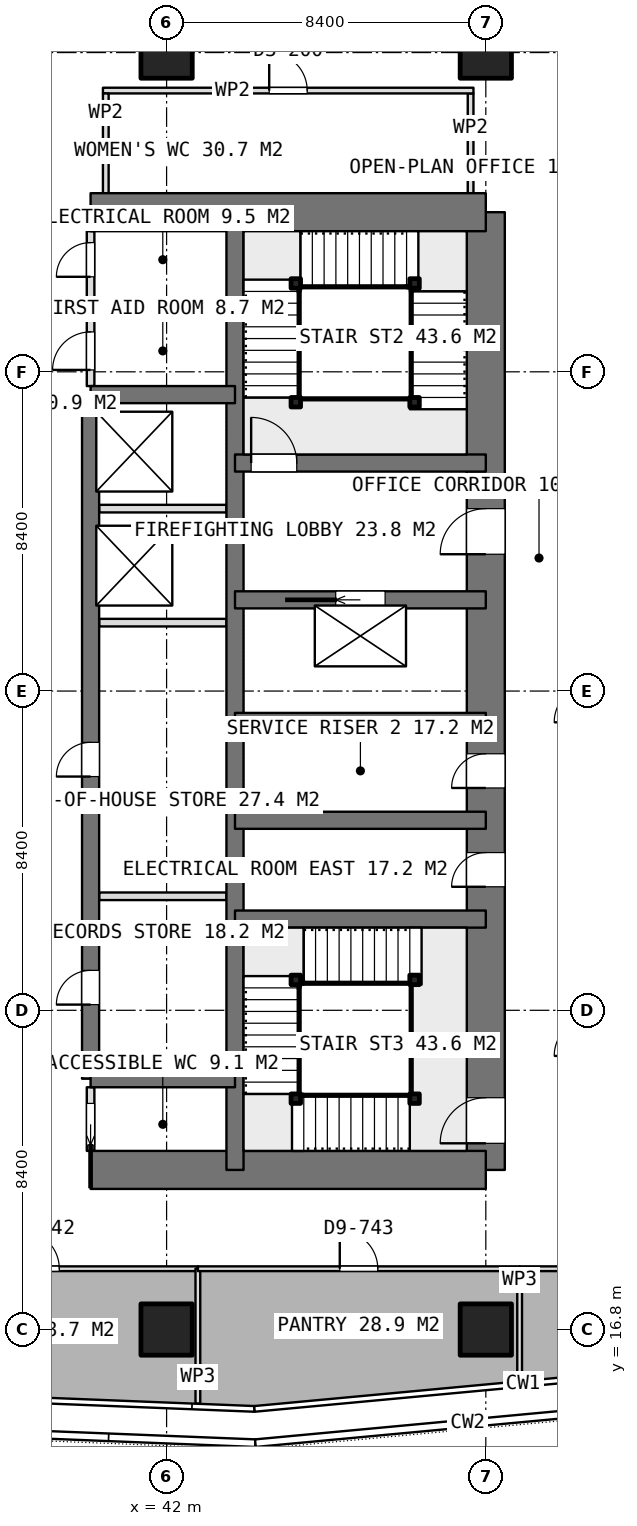
"""IFC4 building model, lengths in metres.
Left out: names, types, materials, properties, quantities, classifications, styles, units other than length and angle.
Written with IfcOpenShell. Run it as: python <this file> out.ifc"""

import sys

from ifc_helpers import new_model, si_unit, direction, frame, frame_2d, origin, origin_2d, place, context, subcontext, project, spatial, rectangle, extrude, element, fill, save


model = new_model("IFC4")
c1 = context("Model", 3, precision=1e-05, world=origin(), true_north=direction((0.0, 1.0)))
c2 = subcontext(c1, "Body", "Model", "MODEL_VIEW")
j1 = project(units=[si_unit("LENGTHUNIT", "METRE"), si_unit("PLANEANGLEUNIT", "RADIAN")], contexts=[c1])
p1 = place(None, origin())
s1 = spatial("IfcSite", under=j1, at=p1, CompositionType="ELEMENT")
p2 = place(p1, origin())
s2 = spatial("IfcBuilding", under=s1, at=p2, CompositionType="ELEMENT")
p3 = place(p2, frame((0.0, 0.0, 187.7)))
s3 = spatial("IfcBuildingStorey", under=s2, at=p3, CompositionType="ELEMENT", Elevation=187.7)
for number, where, z_axis, x_axis in (
    (1, (40.0, 21.0, 0.0), (0.0, 0.0, 1.0), (1.0, 0.0, 0.0)),
    (2, (40.0, 46.2, 0.0), (0.0, 0.0, 1.0), (1.0, 0.0, 0.0)),
):
    element("IfcWall", number, at=place(p3, frame(where, z_axis=z_axis, x_axis=x_axis)), inside=s3, PredefinedType="SHEAR", context=c2, shape_type="SweptSolid", body=[
        extrude(rectangle(XDim=10.4, YDim=1.0, at=frame_2d((5.2, 0.0))), origin(), (0.0, 0.0, 1.0), 3.75),
    ])
p4 = place(p3, frame((50.4, 21.0, 0.0), z_axis=(0.0, 0.0, 1.0), x_axis=(0.0, 1.0, 0.0)))
e3 = element("IfcWall", 3, at=p4, inside=s3, PredefinedType="SHEAR", context=c2, shape_type="SweptSolid", body=[
    extrude(rectangle(XDim=25.2, YDim=1.0, at=frame_2d((12.6, 0.0))), origin(), (0.0, 0.0, 1.0), 3.75),
])
p5 = place(p4, frame((16.2, 0.0, 0.0)))
e4 = element("IfcOpeningElement", 4, at=p5, cuts=e3, PredefinedType="OPENING", context=c2, shape_type="SweptSolid", body=[
    extrude(rectangle(XDim=1.2, YDim=2.1, at=frame_2d((0.6, 1.05))), frame((0.0, 0.51, 0.0), z_axis=(0.0, -1.0, 0.0), x_axis=(1.0, 0.0, 0.0)), (0.0, 0.0, 1.0), 1.02),
])
p6 = place(p4, frame((10.05, 0.0, 0.0)))
e5 = element("IfcOpeningElement", 5, at=p6, cuts=e3, PredefinedType="OPENING", context=c2, shape_type="SweptSolid", body=[
    extrude(rectangle(XDim=0.9, YDim=2.1, at=frame_2d((0.45, 1.05))), frame((0.0, 0.51, 0.0), z_axis=(0.0, -1.0, 0.0), x_axis=(1.0, 0.0, 0.0)), (0.0, 0.0, 1.0), 1.02),
])
p7 = place(p4, frame((7.45, 0.0, 0.0)))
e6 = element("IfcOpeningElement", 6, at=p7, cuts=e3, PredefinedType="OPENING", context=c2, shape_type="SweptSolid", body=[
    extrude(rectangle(XDim=0.9, YDim=2.1, at=frame_2d((0.45, 1.05))), frame((0.0, 0.51, 0.0), z_axis=(0.0, -1.0, 0.0), x_axis=(1.0, 0.0, 0.0)), (0.0, 0.0, 1.0), 1.02),
])
p8 = place(p4, frame((0.7, 0.0, 0.0)))
e7 = element("IfcOpeningElement", 7, at=p8, cuts=e3, PredefinedType="OPENING", context=c2, shape_type="SweptSolid", body=[
    extrude(rectangle(XDim=1.2, YDim=2.1, at=frame_2d((0.6, 1.05))), frame((0.0, 0.51, 0.0), z_axis=(0.0, -1.0, 0.0), x_axis=(1.0, 0.0, 0.0)), (0.0, 0.0, 1.0), 1.02),
])
p9 = place(p3, frame((43.8, 21.0, 0.0), z_axis=(0.0, 0.0, 1.0), x_axis=(0.0, 1.0, 0.0)))
e8 = element("IfcWall", 8, at=p9, inside=s3, PredefinedType="SHEAR", context=c2, shape_type="SweptSolid", body=[
    extrude(rectangle(XDim=25.2, YDim=0.45, at=frame_2d((12.6, 0.0))), origin(), (0.0, 0.0, 1.0), 3.75),
])
p10 = place(p3, frame((40.0, 23.4, 0.0), z_axis=(0.0, 0.0, 1.0), x_axis=(0.0, 1.0, 0.0)))
e9 = element("IfcWall", 9, at=p10, inside=s3, PredefinedType="SHEAR", context=c2, shape_type="SweptSolid", body=[
    extrude(rectangle(XDim=18.0, YDim=0.45, at=frame_2d((9.0, 0.0))), origin(), (0.0, 0.0, 1.0), 3.75),
])
p11 = place(p10, frame((1.95, 0.0, 0.0)))
e10 = element("IfcOpeningElement", 10, at=p11, cuts=e9, PredefinedType="OPENING", context=c2, shape_type="SweptSolid", body=[
    extrude(rectangle(XDim=0.9, YDim=2.1, at=frame_2d((0.45, 1.05))), frame((0.0, 0.235, 0.0), z_axis=(0.0, -1.0, 0.0), x_axis=(1.0, 0.0, 0.0)), (0.0, 0.0, 1.0), 0.47),
])
p12 = place(p10, frame((7.95, 0.0, 0.0)))
e11 = element("IfcOpeningElement", 11, at=p12, cuts=e9, PredefinedType="OPENING", context=c2, shape_type="SweptSolid", body=[
    extrude(rectangle(XDim=0.9, YDim=2.1, at=frame_2d((0.45, 1.05))), frame((0.0, 0.235, 0.0), z_axis=(0.0, -1.0, 0.0), x_axis=(1.0, 0.0, 0.0)), (0.0, 0.0, 1.0), 0.47),
])
for number, where, z_axis, x_axis in (
    (12, (40.0, 23.4, 0.0), (0.0, 0.0, 1.0), (1.0, 0.0, 0.0)),
    (13, (40.0, 41.4, 0.0), (0.0, 0.0, 1.0), (1.0, 0.0, 0.0)),
):
    element("IfcWall", number, at=place(p3, frame(where, z_axis=z_axis, x_axis=x_axis)), inside=s3, PredefinedType="SHEAR", context=c2, shape_type="SweptSolid", body=[
        extrude(rectangle(XDim=3.8, YDim=0.45, at=frame_2d((1.9, 0.0))), origin(), (0.0, 0.0, 1.0), 3.75),
    ])
for number, where, z_axis, x_axis in (
    (14, (43.8, 27.6, 0.0), (0.0, 0.0, 1.0), (1.0, 0.0, 0.0)),
    (15, (43.8, 30.2, 0.0), (0.0, 0.0, 1.0), (1.0, 0.0, 0.0)),
    (16, (43.8, 32.8, 0.0), (0.0, 0.0, 1.0), (1.0, 0.0, 0.0)),
):
    element("IfcWall", number, at=place(p3, frame(where, z_axis=z_axis, x_axis=x_axis)), inside=s3, PredefinedType="SHEAR", context=c2, shape_type="SweptSolid", body=[
        extrude(rectangle(XDim=6.6, YDim=0.45, at=frame_2d((3.3, 0.0))), origin(), (0.0, 0.0, 1.0), 3.75),
    ])
p13 = place(p3, frame((43.8, 36.0, 0.0), z_axis=(0.0, 0.0, 1.0), x_axis=(1.0, 0.0, 0.0)))
e17 = element("IfcWall", 17, at=p13, inside=s3, PredefinedType="SHEAR", context=c2, shape_type="SweptSolid", body=[
    extrude(rectangle(XDim=6.6, YDim=0.45, at=frame_2d((3.3, 0.0))), origin(), (0.0, 0.0, 1.0), 3.75),
])
p14 = place(p13, frame((2.65, 0.0, 0.0)))
e18 = element("IfcOpeningElement", 18, at=p14, cuts=e17, PredefinedType="OPENING", context=c2, shape_type="SweptSolid", body=[
    extrude(rectangle(XDim=1.3, YDim=2.1, at=frame_2d((0.65, 1.05))), frame((0.0, 0.235, 0.0), z_axis=(0.0, -1.0, 0.0), x_axis=(1.0, 0.0, 0.0)), (0.0, 0.0, 1.0), 0.47),
])
p15 = place(p3, frame((43.8, 39.6, 0.0), z_axis=(0.0, 0.0, 1.0), x_axis=(1.0, 0.0, 0.0)))
e19 = element("IfcWall", 19, at=p15, inside=s3, PredefinedType="SHEAR", context=c2, shape_type="SweptSolid", body=[
    extrude(rectangle(XDim=6.6, YDim=0.45, at=frame_2d((3.3, 0.0))), origin(), (0.0, 0.0, 1.0), 3.75),
])
p16 = place(p15, frame((0.425, 0.0, 0.0)))
e20 = element("IfcOpeningElement", 20, at=p16, cuts=e19, PredefinedType="OPENING", context=c2, shape_type="SweptSolid", body=[
    extrude(rectangle(XDim=1.2, YDim=2.1, at=frame_2d((0.6, 1.05))), frame((0.0, 0.235, 0.0), z_axis=(0.0, -1.0, 0.0), x_axis=(1.0, 0.0, 0.0)), (0.0, 0.0, 1.0), 0.47),
])
for number, where, z_axis, x_axis in (
    (21, (42.0, 16.8, 0.0), (0.0, 0.0, 1.0), (1.0, 0.0, 0.0)),
    (22, (42.0, 50.4, 0.0), (0.0, 0.0, 1.0), (1.0, 0.0, 0.0)),
    (23, (50.4, 16.8, 0.0), (0.0, 0.0, 1.0), (1.0, 0.0, 0.0)),
    (24, (50.4, 50.4, 0.0), (0.0, 0.0, 1.0), (1.0, 0.0, 0.0)),
):
    element("IfcColumn", number, at=place(p3, frame(where, z_axis=z_axis, x_axis=x_axis)), inside=s3, PredefinedType="COLUMN", context=c2, shape_type="SweptSolid", body=[
        extrude(rectangle(XDim=1.35, YDim=1.35, at=origin_2d()), origin(), (0.0, 0.0, 1.0), 3.75),
    ])
for number, where, z_axis, x_axis in (
    (25, (40.225, 35.4, 0.0), (0.0, 0.0, 1.0), (1.0, 0.0, 0.0)),
    (26, (40.225, 38.4, 0.0), (0.0, 0.0, 1.0), (1.0, 0.0, 0.0)),
):
    element("IfcWall", number, at=place(p3, frame(where, z_axis=z_axis, x_axis=x_axis)), inside=s3, PredefinedType="PARTITIONING", context=c2, shape_type="SweptSolid", body=[
        extrude(rectangle(XDim=3.35, YDim=0.2, at=frame_2d((1.675, 0.0))), origin(), (0.0, 0.0, 1.0), 3.5),
    ])
p17 = place(p3, frame((40.0, 21.5, 0.0), z_axis=(0.0, 0.0, 1.0), x_axis=(0.0, 1.0, 0.0)))
e27 = element("IfcWall", 27, at=p17, inside=s3, PredefinedType="PARTITIONING", context=c2, shape_type="SweptSolid", body=[
    extrude(rectangle(XDim=1.675, YDim=0.2, at=frame_2d((0.837, 0.0))), origin(), (0.0, 0.0, 1.0), 3.5),
])
p18 = place(p17, frame((0.15, 0.0, 0.0)))
e28 = element("IfcOpeningElement", 28, at=p18, cuts=e27, PredefinedType="OPENING", context=c2, shape_type="SweptSolid", body=[
    extrude(rectangle(XDim=1.1, YDim=2.1, at=frame_2d((0.55, 1.05))), frame((0.0, 0.11, 0.0), z_axis=(0.0, -1.0, 0.0), x_axis=(1.0, 0.0, 0.0)), (0.0, 0.0, 1.0), 0.22),
])
p19 = place(p3, frame((40.0, 41.625, 0.0), z_axis=(0.0, 0.0, 1.0), x_axis=(0.0, 1.0, 0.0)))
e29 = element("IfcWall", 29, at=p19, inside=s3, PredefinedType="PARTITIONING", context=c2, shape_type="SweptSolid", body=[
    extrude(rectangle(XDim=4.075, YDim=0.2, at=frame_2d((2.038, 0.0))), origin(), (0.0, 0.0, 1.0), 3.5),
])
p20 = place(p19, frame((2.875, 0.0, 0.0)))
e30 = element("IfcOpeningElement", 30, at=p20, cuts=e29, PredefinedType="OPENING", context=c2, shape_type="SweptSolid", body=[
    extrude(rectangle(XDim=0.9, YDim=2.1, at=frame_2d((0.45, 1.05))), frame((0.0, 0.11, 0.0), z_axis=(0.0, -1.0, 0.0), x_axis=(1.0, 0.0, 0.0)), (0.0, 0.0, 1.0), 0.22),
])
p21 = place(p19, frame((0.425, 0.0, 0.0)))
e31 = element("IfcOpeningElement", 31, at=p21, cuts=e29, PredefinedType="OPENING", context=c2, shape_type="SweptSolid", body=[
    extrude(rectangle(XDim=1.0, YDim=2.1, at=frame_2d((0.5, 1.05))), frame((0.0, 0.11, 0.0), z_axis=(0.0, -1.0, 0.0), x_axis=(1.0, 0.0, 0.0)), (0.0, 0.0, 1.0), 0.22),
])
p22 = place(p3, frame((40.225, 28.2, 0.0), z_axis=(0.0, 0.0, 1.0), x_axis=(1.0, 0.0, 0.0)))
e32 = element("IfcWall", 32, at=p22, inside=s3, PredefinedType="PARTITIONING", context=c2, shape_type="SweptSolid", body=[
    extrude(rectangle(XDim=3.35, YDim=0.2, at=frame_2d((1.675, 0.0))), origin(), (0.0, 0.0, 1.0), 3.5),
])
p23 = place(p3, frame((40.0, 43.7, 0.0), z_axis=(0.0, 0.0, 1.0), x_axis=(1.0, 0.0, 0.0)))
e33 = element("IfcWall", 33, at=p23, inside=s3, PredefinedType="PARTITIONING", context=c2, shape_type="SweptSolid", body=[
    extrude(rectangle(XDim=3.575, YDim=0.2, at=frame_2d((1.788, 0.0))), origin(), (0.0, 0.0, 1.0), 3.5),
])
p24 = place(p3, frame((40.325, 49.4, 0.0), z_axis=(0.0, 0.0, 1.0), x_axis=(1.0, 0.0, 0.0)))
e34 = element("IfcWall", 34, at=p24, inside=s3, PredefinedType="PARTITIONING", context=c2, shape_type="SweptSolid", body=[
    extrude(rectangle(XDim=9.75, YDim=0.15, at=frame_2d((4.875, 0.0))), origin(), (0.0, 0.0, 1.0), 3.5),
])
p25 = place(p24, frame((4.375, 0.0, 0.0)))
e35 = element("IfcOpeningElement", 35, at=p25, cuts=e34, PredefinedType="OPENING", context=c2, shape_type="SweptSolid", body=[
    extrude(rectangle(XDim=1.0, YDim=2.1, at=frame_2d((0.5, 1.05))), frame((0.0, 0.085, 0.0), z_axis=(0.0, -1.0, 0.0), x_axis=(1.0, 0.0, 0.0)), (0.0, 0.0, 1.0), 0.17),
])
for number, where, z_axis, x_axis in (
    (36, (40.4, 46.7, 0.0), (0.0, 0.0, 1.0), (0.0, 1.0, 0.0)),
    (37, (50.0, 46.7, 0.0), (0.0, 0.0, 1.0), (0.0, 1.0, 0.0)),
):
    element("IfcWall", number, at=place(p3, frame(where, z_axis=z_axis, x_axis=x_axis)), inside=s3, PredefinedType="PARTITIONING", context=c2, shape_type="SweptSolid", body=[
        extrude(rectangle(XDim=2.625, YDim=0.15, at=frame_2d((1.312, 0.0))), origin(), (0.0, 0.0, 1.0), 3.5),
    ])
p26 = place(p3, frame((34.531, 18.4, 0.0), z_axis=(0.0, 0.0, 1.0), x_axis=(1.0, 0.0, 0.0)))
e38 = element("IfcWall", 38, at=p26, inside=s3, PredefinedType="PARTITIONING", context=c2, shape_type="SweptSolid", body=[
    extrude(rectangle(XDim=8.292, YDim=0.125, at=frame_2d((4.146, 0.0))), origin(), (0.0, 0.0, 1.0), 3.5),
])
p27 = place(p26, frame((3.646, 0.0, 0.0)))
e39 = element("IfcOpeningElement", 39, at=p27, cuts=e38, PredefinedType="OPENING", context=c2, shape_type="SweptSolid", body=[
    extrude(rectangle(XDim=1.0, YDim=2.1, at=frame_2d((0.5, 1.05))), frame((0.0, 0.073, 0.0), z_axis=(0.0, -1.0, 0.0), x_axis=(1.0, 0.0, 0.0)), (0.0, 0.0, 1.0), 0.145),
])
p28 = place(p3, frame((42.823, 18.4, 0.0), z_axis=(0.0, 0.0, 1.0), x_axis=(0.0, -1.0, 0.0)))
e40 = element("IfcWall", 40, at=p28, inside=s3, PredefinedType="PARTITIONING", context=c2, shape_type="SweptSolid", body=[
    extrude(rectangle(XDim=3.549, YDim=0.125, at=frame_2d((1.774, 0.0))), origin(), (0.0, 0.0, 1.0), 3.5),
])
p29 = place(p3, frame((42.824, 18.4, 0.0), z_axis=(0.0, 0.0, 1.0), x_axis=(1.0, 0.0, 0.0)))
e41 = element("IfcWall", 41, at=p29, inside=s3, PredefinedType="PARTITIONING", context=c2, shape_type="SweptSolid", body=[
    extrude(rectangle(XDim=8.466, YDim=0.125, at=frame_2d((4.233, 0.0))), origin(), (0.0, 0.0, 1.0), 3.5),
])
p30 = place(p29, frame((3.733, 0.0, 0.0)))
e42 = element("IfcOpeningElement", 42, at=p30, cuts=e41, PredefinedType="OPENING", context=c2, shape_type="SweptSolid", body=[
    extrude(rectangle(XDim=1.0, YDim=2.1, at=frame_2d((0.5, 1.05))), frame((0.0, 0.073, 0.0), z_axis=(0.0, -1.0, 0.0), x_axis=(1.0, 0.0, 0.0)), (0.0, 0.0, 1.0), 0.145),
])
p31 = place(p3, frame((51.29, 18.4, 0.0), z_axis=(0.0, 0.0, 1.0), x_axis=(0.0, -1.0, 0.0)))
e43 = element("IfcWall", 43, at=p31, inside=s3, PredefinedType="PARTITIONING", context=c2, shape_type="SweptSolid", body=[
    extrude(rectangle(XDim=2.958, YDim=0.125, at=frame_2d((1.479, 0.0))), origin(), (0.0, 0.0, 1.0), 3.5),
])
p32 = place(p3, frame((51.291, 18.4, 0.0), z_axis=(0.0, 0.0, 1.0), x_axis=(1.0, 0.0, 0.0)))
e44 = element("IfcWall", 44, at=p32, inside=s3, PredefinedType="PARTITIONING", context=c2, shape_type="SweptSolid", body=[
    extrude(rectangle(XDim=5.109, YDim=0.125, at=frame_2d((2.554, 0.0))), origin(), (0.0, 0.0, 1.0), 3.5),
])
p33 = place(p32, frame((2.055, 0.0, 0.0)))
e45 = element("IfcOpeningElement", 45, at=p33, cuts=e44, PredefinedType="OPENING", context=c2, shape_type="SweptSolid", body=[
    extrude(rectangle(XDim=1.0, YDim=2.1, at=frame_2d((0.5, 1.05))), frame((0.0, 0.073, 0.0), z_axis=(0.0, -1.0, 0.0), x_axis=(1.0, 0.0, 0.0)), (0.0, 0.0, 1.0), 0.145),
])
for number, where, z_axis, x_axis in (
    (46, (45.4, 41.2, 0.0), (0.0, 0.0, 1.0), (1.0, 0.0, 0.0)),
    (47, (45.4, 44.325, 0.0), (0.0, 0.0, 1.0), (1.0, 0.0, 0.0)),
    (48, (48.525, 44.325, 0.0), (0.0, 0.0, 1.0), (1.0, 0.0, 0.0)),
    (49, (48.525, 41.2, 0.0), (0.0, 0.0, 1.0), (1.0, 0.0, 0.0)),
    (50, (48.525, 22.875, 0.0), (0.0, 0.0, 1.0), (1.0, 0.0, 0.0)),
    (51, (45.4, 22.875, 0.0), (0.0, 0.0, 1.0), (1.0, 0.0, 0.0)),
    (52, (45.4, 26.0, 0.0), (0.0, 0.0, 1.0), (1.0, 0.0, 0.0)),
    (53, (48.525, 26.0, 0.0), (0.0, 0.0, 1.0), (1.0, 0.0, 0.0)),
):
    element("IfcColumn", number, at=place(p3, frame(where, z_axis=z_axis, x_axis=x_axis)), inside=s3, PredefinedType="COLUMN", context=c2, shape_type="SweptSolid", body=[
        extrude(rectangle(XDim=0.25, YDim=0.25, at=origin_2d()), origin(), (0.0, 0.0, 1.0), 3.75),
    ])
p34 = place(p5, origin())
e54 = element("IfcDoor", 54, at=p34, inside=s3, OperationType="SINGLE_SWING_LEFT", PredefinedType="DOOR", context=c2, shape_type="SweptSolid", body=[
    extrude(rectangle(XDim=1.2, YDim=2.1, at=frame_2d((0.6, 1.05))), frame((0.0, 0.025, 0.0), z_axis=(0.0, -1.0, 0.0), x_axis=(1.0, 0.0, 0.0)), (0.0, 0.0, 1.0), 0.05),
])
fill(e4, e54)
p35 = place(p6, origin())
e55 = element("IfcDoor", 55, at=p35, inside=s3, OperationType="SINGLE_SWING_LEFT", PredefinedType="DOOR", context=c2, shape_type="SweptSolid", body=[
    extrude(rectangle(XDim=0.9, YDim=2.1, at=frame_2d((0.45, 1.05))), frame((0.0, 0.025, 0.0), z_axis=(0.0, -1.0, 0.0), x_axis=(1.0, 0.0, 0.0)), (0.0, 0.0, 1.0), 0.05),
])
fill(e5, e55)
p36 = place(p7, origin())
e56 = element("IfcDoor", 56, at=p36, inside=s3, OperationType="SINGLE_SWING_LEFT", PredefinedType="DOOR", context=c2, shape_type="SweptSolid", body=[
    extrude(rectangle(XDim=0.9, YDim=2.1, at=frame_2d((0.45, 1.05))), frame((0.0, 0.025, 0.0), z_axis=(0.0, -1.0, 0.0), x_axis=(1.0, 0.0, 0.0)), (0.0, 0.0, 1.0), 0.05),
])
fill(e6, e56)
p37 = place(p18, origin())
e57 = element("IfcDoor", 57, at=p37, inside=s3, OperationType="SLIDING_TO_LEFT", PredefinedType="DOOR", context=c2, shape_type="SweptSolid", body=[
    extrude(rectangle(XDim=1.1, YDim=2.1, at=frame_2d((0.55, 1.05))), frame((0.0, 0.025, 0.0), z_axis=(0.0, -1.0, 0.0), x_axis=(1.0, 0.0, 0.0)), (0.0, 0.0, 1.0), 0.05),
])
fill(e28, e57)
p38 = place(p20, origin())
e58 = element("IfcDoor", 58, at=p38, inside=s3, OperationType="SINGLE_SWING_LEFT", PredefinedType="DOOR", context=c2, shape_type="SweptSolid", body=[
    extrude(rectangle(XDim=0.9, YDim=2.1, at=frame_2d((0.45, 1.05))), frame((0.0, 0.025, 0.0), z_axis=(0.0, -1.0, 0.0), x_axis=(1.0, 0.0, 0.0)), (0.0, 0.0, 1.0), 0.05),
])
fill(e30, e58)
p39 = place(p21, origin())
e59 = element("IfcDoor", 59, at=p39, inside=s3, OperationType="SINGLE_SWING_LEFT", PredefinedType="DOOR", context=c2, shape_type="SweptSolid", body=[
    extrude(rectangle(XDim=1.0, YDim=2.1, at=frame_2d((0.5, 1.05))), frame((0.0, 0.025, 0.0), z_axis=(0.0, -1.0, 0.0), x_axis=(1.0, 0.0, 0.0)), (0.0, 0.0, 1.0), 0.05),
])
fill(e31, e59)
p40 = place(p11, origin())
e60 = element("IfcDoor", 60, at=p40, inside=s3, OperationType="SINGLE_SWING_LEFT", PredefinedType="DOOR", context=c2, shape_type="SweptSolid", body=[
    extrude(rectangle(XDim=0.9, YDim=2.1, at=frame_2d((0.45, 1.05))), frame((0.0, 0.025, 0.0), z_axis=(0.0, -1.0, 0.0), x_axis=(1.0, 0.0, 0.0)), (0.0, 0.0, 1.0), 0.05),
])
fill(e10, e60)
p41 = place(p12, origin())
e61 = element("IfcDoor", 61, at=p41, inside=s3, OperationType="SINGLE_SWING_LEFT", PredefinedType="DOOR", context=c2, shape_type="SweptSolid", body=[
    extrude(rectangle(XDim=0.9, YDim=2.1, at=frame_2d((0.45, 1.05))), frame((0.0, 0.025, 0.0), z_axis=(0.0, -1.0, 0.0), x_axis=(1.0, 0.0, 0.0)), (0.0, 0.0, 1.0), 0.05),
])
fill(e11, e61)
p42 = place(p14, origin())
e62 = element("IfcDoor", 62, at=p42, inside=s3, OperationType="SLIDING_TO_LEFT", PredefinedType="USERDEFINED", context=c2, shape_type="SweptSolid", body=[
    extrude(rectangle(XDim=1.3, YDim=2.1, at=frame_2d((0.65, 1.05))), frame((0.0, 0.025, 0.0), z_axis=(0.0, -1.0, 0.0), x_axis=(1.0, 0.0, 0.0)), (0.0, 0.0, 1.0), 0.05),
])
fill(e18, e62)
p43 = place(p25, origin())
e63 = element("IfcDoor", 63, at=p43, inside=s3, OperationType="SINGLE_SWING_LEFT", PredefinedType="DOOR", context=c2, shape_type="SweptSolid", body=[
    extrude(rectangle(XDim=1.0, YDim=2.1, at=frame_2d((0.5, 1.05))), frame((0.0, 0.025, 0.0), z_axis=(0.0, -1.0, 0.0), x_axis=(1.0, 0.0, 0.0)), (0.0, 0.0, 1.0), 0.05),
])
fill(e35, e63)
p44 = place(p27, origin())
e64 = element("IfcDoor", 64, at=p44, inside=s3, OperationType="SINGLE_SWING_LEFT", PredefinedType="DOOR", context=c2, shape_type="SweptSolid", body=[
    extrude(rectangle(XDim=1.0, YDim=2.1, at=frame_2d((0.5, 1.05))), frame((0.0, 0.025, 0.0), z_axis=(0.0, -1.0, 0.0), x_axis=(1.0, 0.0, 0.0)), (0.0, 0.0, 1.0), 0.05),
])
fill(e39, e64)
p45 = place(p30, origin())
e65 = element("IfcDoor", 65, at=p45, inside=s3, OperationType="SINGLE_SWING_LEFT", PredefinedType="DOOR", context=c2, shape_type="SweptSolid", body=[
    extrude(rectangle(XDim=1.0, YDim=2.1, at=frame_2d((0.5, 1.05))), frame((0.0, 0.025, 0.0), z_axis=(0.0, -1.0, 0.0), x_axis=(1.0, 0.0, 0.0)), (0.0, 0.0, 1.0), 0.05),
])
fill(e42, e65)
p46 = place(p16, origin())
e66 = element("IfcDoor", 66, at=p46, inside=s3, OperationType="SINGLE_SWING_RIGHT", PredefinedType="DOOR", context=c2, shape_type="SweptSolid", body=[
    extrude(rectangle(XDim=1.2, YDim=2.1, at=frame_2d((0.6, 1.05))), frame((0.0, 0.025, 0.0), z_axis=(0.0, -1.0, 0.0), x_axis=(1.0, 0.0, 0.0)), (0.0, 0.0, 1.0), 0.05),
])
fill(e20, e66)
p47 = place(p8, origin())
e67 = element("IfcDoor", 67, at=p47, inside=s3, OperationType="SINGLE_SWING_RIGHT", PredefinedType="DOOR", context=c2, shape_type="SweptSolid", body=[
    extrude(rectangle(XDim=1.2, YDim=2.1, at=frame_2d((0.6, 1.05))), frame((0.0, 0.025, 0.0), z_axis=(0.0, -1.0, 0.0), x_axis=(1.0, 0.0, 0.0)), (0.0, 0.0, 1.0), 0.05),
])
fill(e7, e67)
save(model, sys.argv[1])
